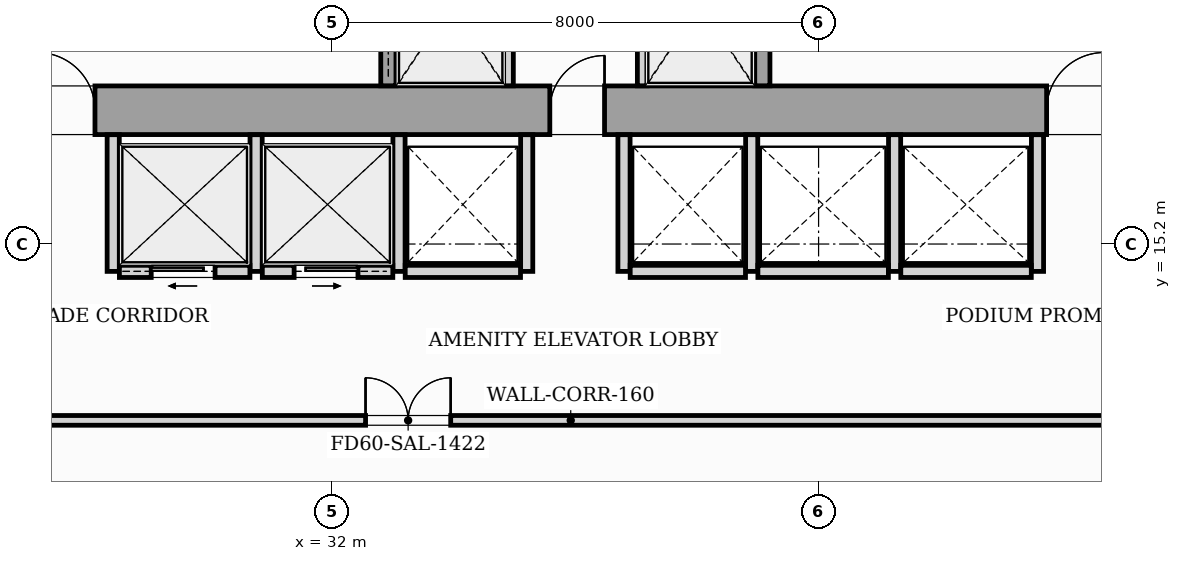
"""IFC4 building model, lengths in metres.
Left out: names, types, materials, properties, quantities, classifications, styles, units other than length and angle.
Written with IfcOpenShell. Run it as: python <this file> out.ifc"""

import sys

from ifc_helpers import new_model, si_unit, direction, frame, frame_2d, origin, origin_2d, place, context, subcontext, project, spatial, rectangle, i_section, extrude, source, transform, mapped, element, fill, save


model = new_model("IFC4")
c1 = context("Model", 3, precision=1e-05, world=origin(), true_north=direction((0.0, 1.0)))
c2 = subcontext(c1, "Body", "Model", "MODEL_VIEW")
j1 = project(units=[si_unit("LENGTHUNIT", "METRE"), si_unit("PLANEANGLEUNIT", "RADIAN")], contexts=[c1])
p1 = place(None, origin())
s1 = spatial("IfcSite", under=j1, at=p1, CompositionType="ELEMENT")
p2 = place(p1, origin())
s2 = spatial("IfcBuilding", under=s1, at=p2, CompositionType="ELEMENT")
p3 = place(p2, frame((0.0, 0.0, 18.5)))
s3 = spatial("IfcBuildingStorey", under=s2, at=p3, CompositionType="ELEMENT", Elevation=18.5)
m1 = source(origin(), c2, "Body", "SweptSolid", [
    extrude(i_section(OverallWidth=0.437, OverallDepth=0.514, WebThickness=0.061, FlangeThickness=0.097, FilletRadius=0.018, at=origin_2d()), origin(), (0.0, 0.0, 1.0), 4.496),
])
for number, where, z_axis, x_axis in (
    (1, (33.12, 17.4, 0.002), (0.0, 0.0, 1.0), (1.0, 0.0, 0.0)),
    (2, (38.88, 17.4, 0.002), (0.0, 0.0, 1.0), (1.0, 0.0, 0.0)),
):
    element("IfcColumn", number, at=place(p3, frame(where, z_axis=z_axis, x_axis=x_axis)), inside=s3, PredefinedType="PILASTER", context=c2, shape_type="MappedRepresentation", body=[
        mapped(m1, transform((0.0, 0.0, 0.0), scale=1.0)),
    ])
p4 = place(p3, frame((26.0, 17.4, 0.0), z_axis=(0.0, 0.0, 1.0), x_axis=(1.0, 0.0, 0.0)))
e3 = element("IfcWall", 3, at=p4, inside=s3, PredefinedType="SHEAR", context=c2, shape_type="SweptSolid", body=[
    extrude(rectangle(XDim=20.0, YDim=0.8, at=frame_2d((10.0, 0.0))), origin(), (0.0, 0.0, 1.0), 4.5),
])
p5 = place(p4, frame((1.15, 0.0, 0.0)))
e4 = element("IfcOpeningElement", 4, at=p5, cuts=e3, PredefinedType="OPENING", context=c2, shape_type="SweptSolid", body=[
    extrude(rectangle(XDim=0.95, YDim=2.06, at=frame_2d((0.475, 1.03))), frame((0.0, 0.41, 0.0), z_axis=(0.0, -1.0, 0.0), x_axis=(1.0, 0.0, 0.0)), (0.0, 0.0, 1.0), 0.82),
])
p6 = place(p4, frame((9.58, 0.0, 0.0)))
e5 = element("IfcOpeningElement", 5, at=p6, cuts=e3, PredefinedType="OPENING", context=c2, shape_type="SweptSolid", body=[
    extrude(rectangle(XDim=0.9, YDim=2.06, at=frame_2d((0.45, 1.03))), frame((0.0, 0.41, 0.0), z_axis=(0.0, -1.0, 0.0), x_axis=(1.0, 0.0, 0.0)), (0.0, 0.0, 1.0), 0.82),
])
p7 = place(p4, frame((17.75, 0.0, 0.0)))
e6 = element("IfcOpeningElement", 6, at=p7, cuts=e3, PredefinedType="OPENING", context=c2, shape_type="SweptSolid", body=[
    extrude(rectangle(XDim=0.95, YDim=2.06, at=frame_2d((0.475, 1.03))), frame((0.0, 0.41, 0.0), z_axis=(0.0, -1.0, 0.0), x_axis=(1.0, 0.0, 0.0)), (0.0, 0.0, 1.0), 0.82),
])
p8 = place(p3, frame((32.925, 17.802, 0.0), z_axis=(0.0, 0.0, 1.0), x_axis=(0.0, 1.0, 0.0)))
e7 = element("IfcWall", 7, at=p8, inside=s3, PredefinedType="SOLIDWALL", context=c2, shape_type="SweptSolid", body=[
    extrude(rectangle(XDim=2.646, YDim=0.25, at=frame_2d((1.323, 0.0))), origin(), (0.0, 0.0, 1.0), 4.5),
])
p9 = place(p8, frame((0.648, 0.0, 0.0)))
e8 = element("IfcOpeningElement", 8, at=p9, cuts=e7, PredefinedType="OPENING", context=c2, shape_type="SweptSolid", body=[
    extrude(rectangle(XDim=1.1, YDim=2.08, at=frame_2d((0.55, 1.04))), frame((0.0, 0.135, 0.0), z_axis=(0.0, -1.0, 0.0), x_axis=(1.0, 0.0, 0.0)), (0.0, 0.0, 1.0), 0.27),
])
for number, where, z_axis, x_axis in (
    (9, (34.9, 17.802, 0.0), (0.0, 0.0, 1.0), (0.0, 1.0, 0.0)),
    (10, (37.1, 17.802, 0.0), (0.0, 0.0, 1.0), (0.0, 1.0, 0.0)),
):
    element("IfcWall", number, at=place(p3, frame(where, z_axis=z_axis, x_axis=x_axis)), inside=s3, PredefinedType="PARTITIONING", context=c2, shape_type="SweptSolid", body=[
        extrude(rectangle(XDim=2.646, YDim=0.16, at=frame_2d((1.323, 0.0))), origin(), (0.0, 0.0, 1.0), 4.08),
    ])
p10 = place(p3, frame((39.075, 17.802, 0.0), z_axis=(0.0, 0.0, 1.0), x_axis=(0.0, 1.0, 0.0)))
e11 = element("IfcWall", 11, at=p10, inside=s3, PredefinedType="SOLIDWALL", context=c2, shape_type="SweptSolid", body=[
    extrude(rectangle(XDim=2.646, YDim=0.25, at=frame_2d((1.323, 0.0))), origin(), (0.0, 0.0, 1.0), 4.5),
])
p11 = place(p10, frame((0.648, 0.0, 0.0)))
e12 = element("IfcOpeningElement", 12, at=p11, cuts=e11, PredefinedType="OPENING", context=c2, shape_type="SweptSolid", body=[
    extrude(rectangle(XDim=1.1, YDim=2.08, at=frame_2d((0.55, 1.04))), frame((0.0, 0.135, 0.0), z_axis=(0.0, -1.0, 0.0), x_axis=(1.0, 0.0, 0.0)), (0.0, 0.0, 1.0), 0.27),
])
for number, where, z_axis, x_axis in (
    (13, (28.4, 14.75, 0.0), (0.0, 0.0, 1.0), (0.0, 1.0, 0.0)),
    (14, (30.75, 14.75, 0.0), (0.0, 0.0, 1.0), (0.0, 1.0, 0.0)),
    (15, (33.1, 14.75, 0.0), (0.0, 0.0, 1.0), (0.0, 1.0, 0.0)),
):
    element("IfcWall", number, at=place(p3, frame(where, z_axis=z_axis, x_axis=x_axis)), inside=s3, PredefinedType="PARTITIONING", context=c2, shape_type="SweptSolid", body=[
        extrude(rectangle(XDim=2.248, YDim=0.2, at=frame_2d((1.124, 0.0))), origin(), (0.0, 0.0, 1.0), 4.08),
    ])
p12 = place(p3, frame((28.502, 14.75, 0.0), z_axis=(0.0, 0.0, 1.0), x_axis=(1.0, 0.0, 0.0)))
e16 = element("IfcWall", 16, at=p12, inside=s3, PredefinedType="PARTITIONING", context=c2, shape_type="SweptSolid", body=[
    extrude(rectangle(XDim=2.146, YDim=0.2, at=frame_2d((1.073, 0.0))), origin(), (0.0, 0.0, 1.0), 4.08),
])
p13 = place(p12, frame((0.523, 0.0, 0.0)))
e17 = element("IfcOpeningElement", 17, at=p13, cuts=e16, PredefinedType="OPENING", context=c2, shape_type="SweptSolid", body=[
    extrude(rectangle(XDim=1.05, YDim=2.08, at=frame_2d((0.525, 1.04))), frame((0.0, 0.11, 0.0), z_axis=(0.0, -1.0, 0.0), x_axis=(1.0, 0.0, 0.0)), (0.0, 0.0, 1.0), 0.22),
])
p14 = place(p3, frame((30.852, 14.75, 0.0), z_axis=(0.0, 0.0, 1.0), x_axis=(1.0, 0.0, 0.0)))
e18 = element("IfcWall", 18, at=p14, inside=s3, PredefinedType="PARTITIONING", context=c2, shape_type="SweptSolid", body=[
    extrude(rectangle(XDim=2.146, YDim=0.2, at=frame_2d((1.073, 0.0))), origin(), (0.0, 0.0, 1.0), 4.08),
])
p15 = place(p14, frame((0.523, 0.0, 0.0)))
e19 = element("IfcOpeningElement", 19, at=p15, cuts=e18, PredefinedType="OPENING", context=c2, shape_type="SweptSolid", body=[
    extrude(rectangle(XDim=1.05, YDim=2.08, at=frame_2d((0.525, 1.04))), frame((0.0, 0.11, 0.0), z_axis=(0.0, -1.0, 0.0), x_axis=(1.0, 0.0, 0.0)), (0.0, 0.0, 1.0), 0.22),
])
p16 = place(p3, frame((35.2, 14.75, 0.0), z_axis=(0.0, 0.0, 1.0), x_axis=(0.0, 1.0, 0.0)))
e20 = element("IfcWall", 20, at=p16, inside=s3, PredefinedType="PARTITIONING", context=c2, shape_type="SweptSolid", body=[
    extrude(rectangle(XDim=2.248, YDim=0.2, at=frame_2d((1.124, 0.0))), origin(), (0.0, 0.0, 1.0), 4.08),
])
p17 = place(p3, frame((33.202, 14.75, 0.0), z_axis=(0.0, 0.0, 1.0), x_axis=(1.0, 0.0, 0.0)))
e21 = element("IfcWall", 21, at=p17, inside=s3, PredefinedType="PARTITIONING", context=c2, shape_type="SweptSolid", body=[
    extrude(rectangle(XDim=1.896, YDim=0.2, at=frame_2d((0.948, 0.0))), origin(), (0.0, 0.0, 1.0), 4.08),
])
for number, where, z_axis, x_axis in (
    (22, (36.8, 14.75, 0.0), (0.0, 0.0, 1.0), (0.0, 1.0, 0.0)),
    (23, (38.9, 14.75, 0.0), (0.0, 0.0, 1.0), (0.0, 1.0, 0.0)),
):
    element("IfcWall", number, at=place(p3, frame(where, z_axis=z_axis, x_axis=x_axis)), inside=s3, PredefinedType="PARTITIONING", context=c2, shape_type="SweptSolid", body=[
        extrude(rectangle(XDim=2.248, YDim=0.2, at=frame_2d((1.124, 0.0))), origin(), (0.0, 0.0, 1.0), 4.08),
    ])
p18 = place(p3, frame((36.902, 14.75, 0.0), z_axis=(0.0, 0.0, 1.0), x_axis=(1.0, 0.0, 0.0)))
e24 = element("IfcWall", 24, at=p18, inside=s3, PredefinedType="PARTITIONING", context=c2, shape_type="SweptSolid", body=[
    extrude(rectangle(XDim=1.896, YDim=0.2, at=frame_2d((0.948, 0.0))), origin(), (0.0, 0.0, 1.0), 4.08),
])
for number, where, z_axis, x_axis in (
    (25, (41.25, 14.75, 0.0), (0.0, 0.0, 1.0), (0.0, 1.0, 0.0)),
    (26, (43.6, 14.75, 0.0), (0.0, 0.0, 1.0), (0.0, 1.0, 0.0)),
):
    element("IfcWall", number, at=place(p3, frame(where, z_axis=z_axis, x_axis=x_axis)), inside=s3, PredefinedType="PARTITIONING", context=c2, shape_type="SweptSolid", body=[
        extrude(rectangle(XDim=2.248, YDim=0.2, at=frame_2d((1.124, 0.0))), origin(), (0.0, 0.0, 1.0), 4.08),
    ])
for number, where, z_axis, x_axis in (
    (27, (39.002, 14.75, 0.0), (0.0, 0.0, 1.0), (1.0, 0.0, 0.0)),
    (28, (41.352, 14.75, 0.0), (0.0, 0.0, 1.0), (1.0, 0.0, 0.0)),
):
    element("IfcWall", number, at=place(p3, frame(where, z_axis=z_axis, x_axis=x_axis)), inside=s3, PredefinedType="PARTITIONING", context=c2, shape_type="SweptSolid", body=[
        extrude(rectangle(XDim=2.146, YDim=0.2, at=frame_2d((1.073, 0.0))), origin(), (0.0, 0.0, 1.0), 4.08),
    ])
p19 = place(p3, frame((4.55, 12.3, 0.0), z_axis=(0.0, 0.0, 1.0), x_axis=(1.0, 0.0, 0.0)))
e29 = element("IfcWall", 29, at=p19, inside=s3, PredefinedType="PARTITIONING", context=c2, shape_type="SweptSolid", body=[
    extrude(rectangle(XDim=62.748, YDim=0.16, at=frame_2d((31.374, 0.0))), origin(), (0.0, 0.0, 1.0), 4.08),
])
p20 = place(p19, frame((6.5, 0.0, 0.0)))
e30 = element("IfcOpeningElement", 30, at=p20, cuts=e29, PredefinedType="OPENING", context=c2, shape_type="SweptSolid", body=[
    extrude(rectangle(XDim=1.4, YDim=2.08, at=frame_2d((0.7, 1.04))), frame((0.0, 0.09, 0.0), z_axis=(0.0, -1.0, 0.0), x_axis=(1.0, 0.0, 0.0)), (0.0, 0.0, 1.0), 0.18),
])
p21 = place(p19, frame((28.0, 0.0, 0.0)))
e31 = element("IfcOpeningElement", 31, at=p21, cuts=e29, PredefinedType="OPENING", context=c2, shape_type="SweptSolid", body=[
    extrude(rectangle(XDim=1.4, YDim=2.08, at=frame_2d((0.7, 1.04))), frame((0.0, 0.09, 0.0), z_axis=(0.0, -1.0, 0.0), x_axis=(1.0, 0.0, 0.0)), (0.0, 0.0, 1.0), 0.18),
])
m2 = source(origin(), c2, "Body", "SweptSolid", [
    extrude(rectangle(XDim=0.95, YDim=2.06, at=frame_2d((0.475, 1.03))), frame((0.0, 0.025, 0.0), z_axis=(0.0, -1.0, 0.0), x_axis=(1.0, 0.0, 0.0)), (0.0, 0.0, 1.0), 0.05),
])
p22 = place(p5, origin())
e32 = element("IfcDoor", 32, at=p22, inside=s3, OperationType="SINGLE_SWING_LEFT", PredefinedType="DOOR", context=c2, shape_type="MappedRepresentation", body=[
    mapped(m2, transform((0.0, 0.0, 0.0), scale=1.0)),
])
fill(e4, e32)
m3 = source(origin(), c2, "Body", "SweptSolid", [
    extrude(rectangle(XDim=0.9, YDim=2.06, at=frame_2d((0.45, 1.03))), frame((0.0, 0.025, 0.0), z_axis=(0.0, -1.0, 0.0), x_axis=(1.0, 0.0, 0.0)), (0.0, 0.0, 1.0), 0.05),
])
p23 = place(p6, origin())
e33 = element("IfcDoor", 33, at=p23, inside=s3, OperationType="SINGLE_SWING_RIGHT", PredefinedType="DOOR", context=c2, shape_type="MappedRepresentation", body=[
    mapped(m3, transform((0.0, 0.0, 0.0), scale=1.0)),
])
fill(e5, e33)
p24 = place(p7, origin())
e34 = element("IfcDoor", 34, at=p24, inside=s3, OperationType="SINGLE_SWING_RIGHT", PredefinedType="DOOR", context=c2, shape_type="MappedRepresentation", body=[
    mapped(m2, transform((0.0, 0.0, 0.0), scale=1.0)),
])
fill(e6, e34)
m4 = source(origin(), c2, "Body", "SweptSolid", [
    extrude(rectangle(XDim=1.05, YDim=2.08, at=frame_2d((0.525, 1.04))), frame((0.0, 0.025, 0.0), z_axis=(0.0, -1.0, 0.0), x_axis=(1.0, 0.0, 0.0)), (0.0, 0.0, 1.0), 0.05),
])
p25 = place(p13, origin())
e35 = element("IfcDoor", 35, at=p25, inside=s3, OperationType="SLIDING_TO_LEFT", PredefinedType="DOOR", context=c2, shape_type="MappedRepresentation", body=[
    mapped(m4, transform((0.0, 0.0, 0.0), scale=1.0)),
])
fill(e17, e35)
p26 = place(p15, origin())
e36 = element("IfcDoor", 36, at=p26, inside=s3, OperationType="SLIDING_TO_RIGHT", PredefinedType="DOOR", context=c2, shape_type="MappedRepresentation", body=[
    mapped(m4, transform((0.0, 0.0, 0.0), scale=1.0)),
])
fill(e19, e36)
m5 = source(origin(), c2, "Body", "SweptSolid", [
    extrude(rectangle(XDim=1.4, YDim=2.08, at=frame_2d((0.7, 1.04))), frame((0.0, 0.025, 0.0), z_axis=(0.0, -1.0, 0.0), x_axis=(1.0, 0.0, 0.0)), (0.0, 0.0, 1.0), 0.05),
])
p27 = place(p21, origin())
e37 = element("IfcDoor", 37, at=p27, inside=s3, OperationType="DOUBLE_DOOR_SINGLE_SWING", PredefinedType="DOOR", context=c2, shape_type="MappedRepresentation", body=[
    mapped(m5, transform((0.0, 0.0, 0.0), scale=1.0)),
])
fill(e31, e37)
save(model, sys.argv[1])
